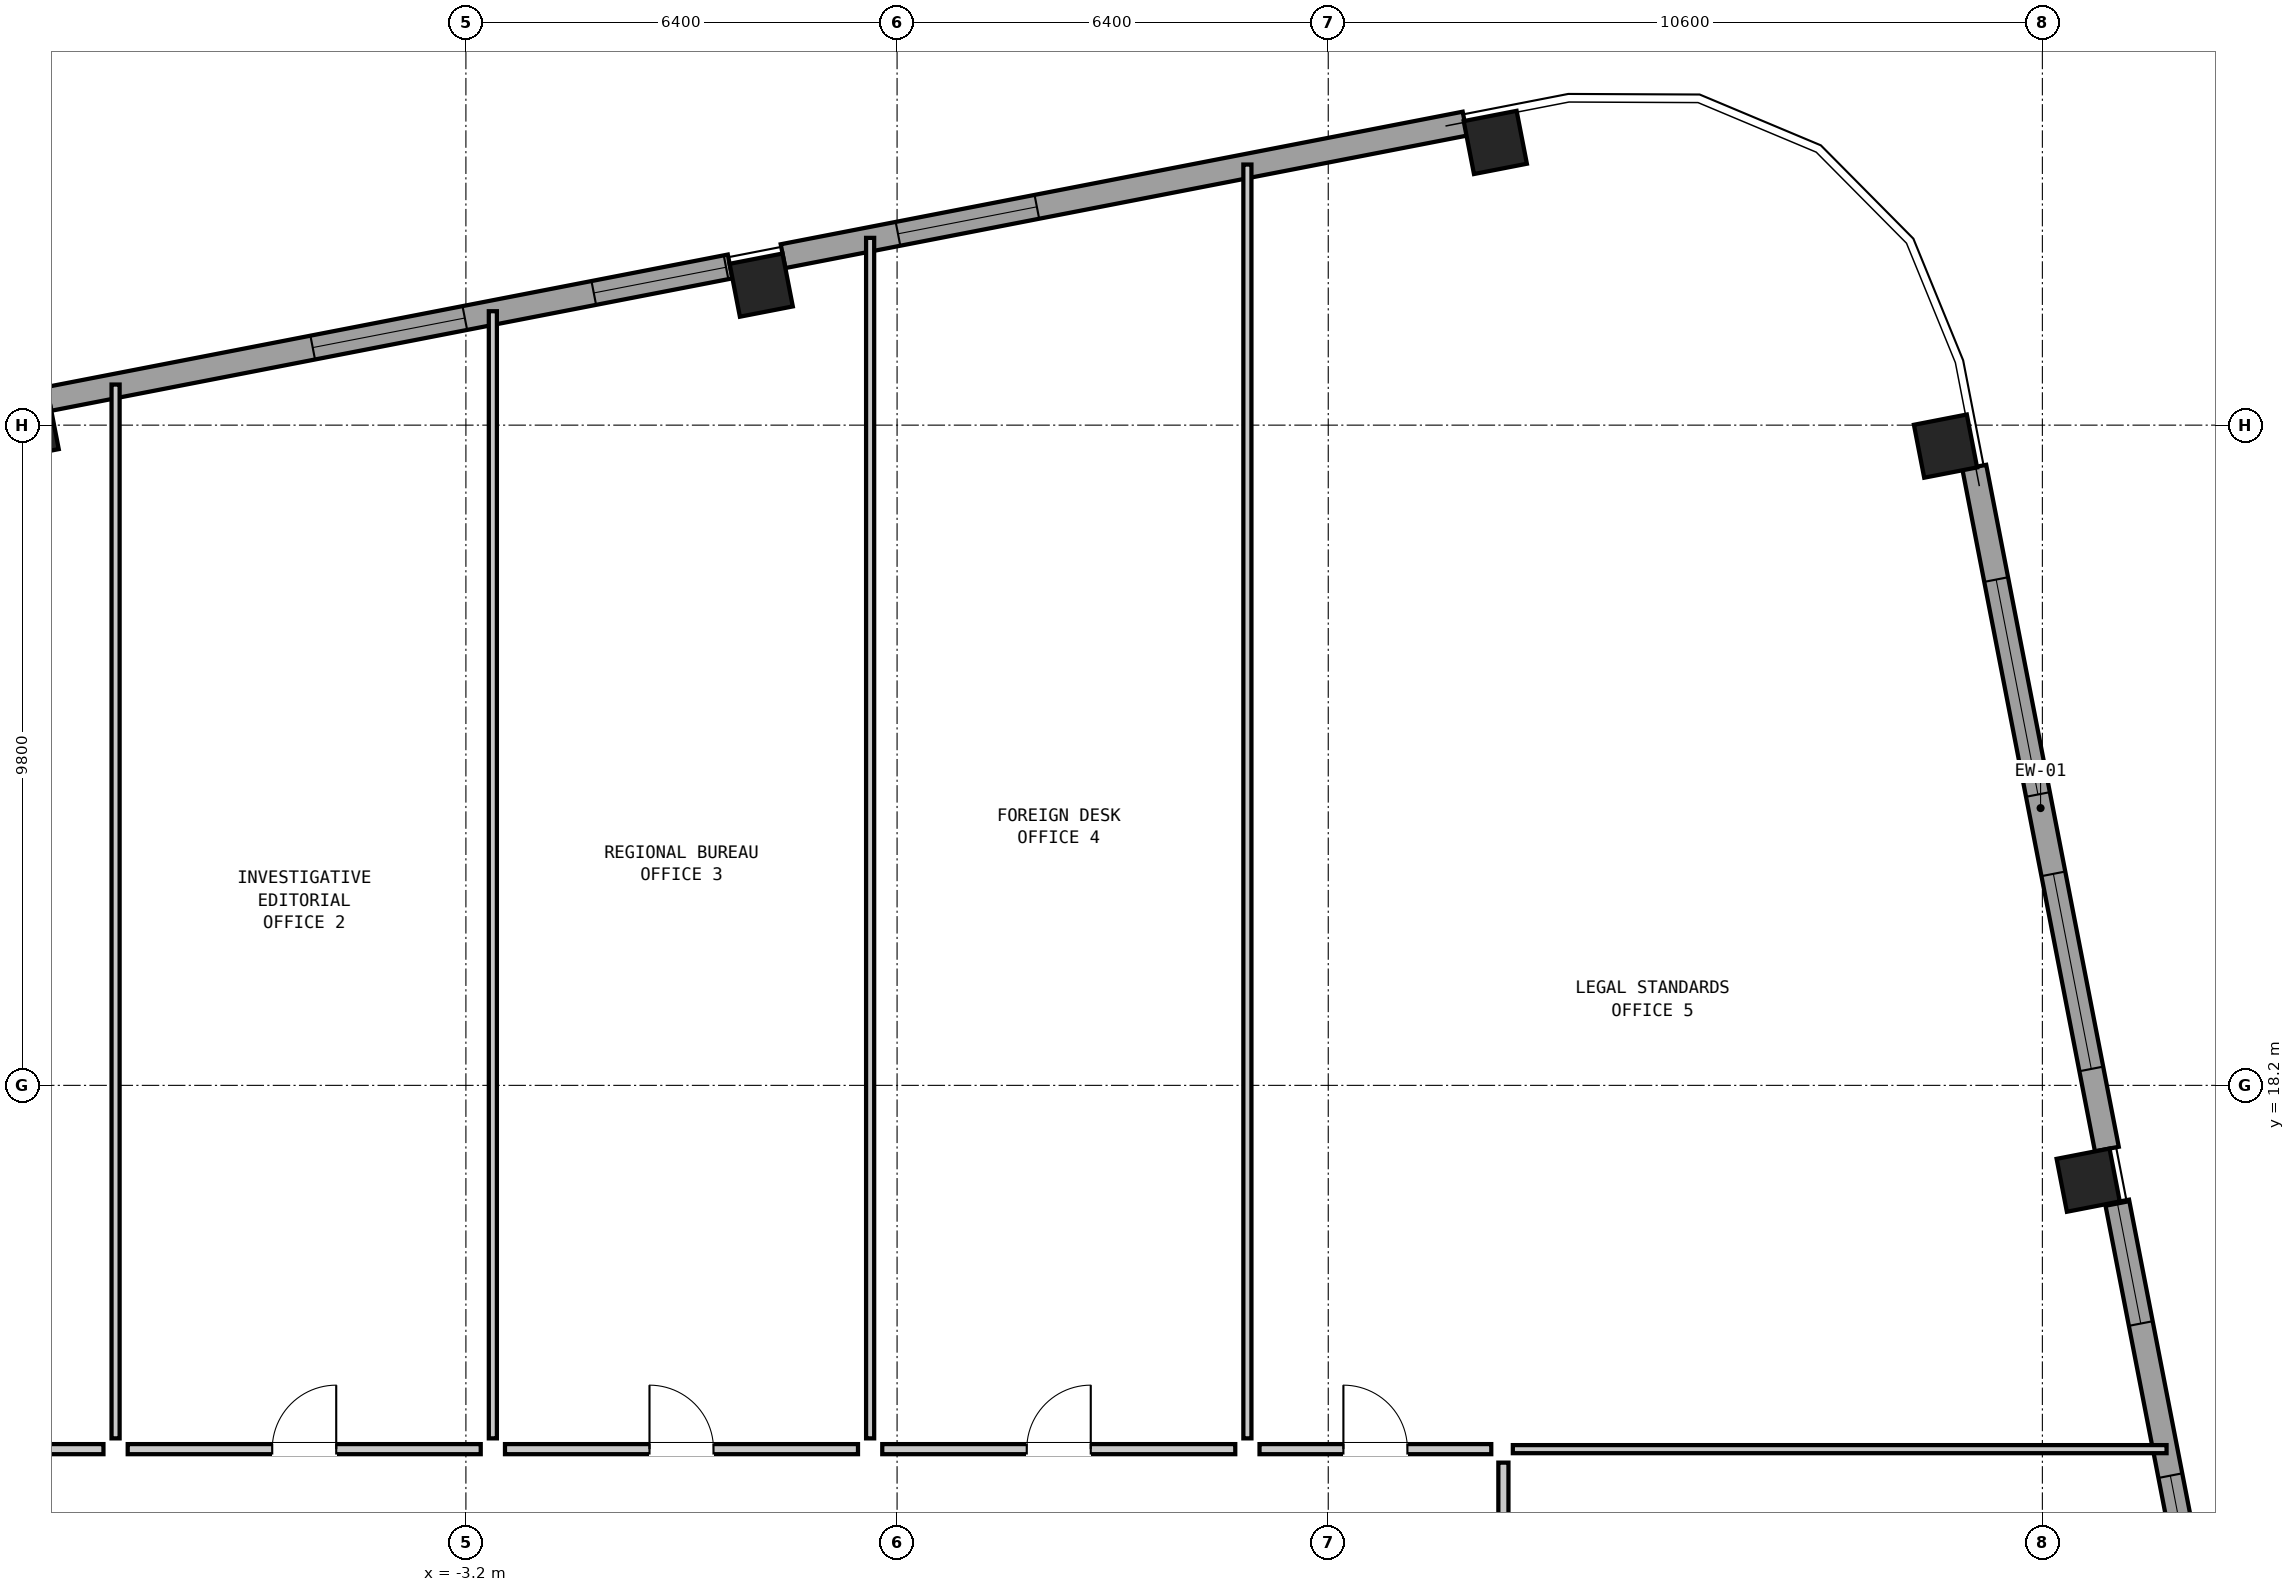
"""IFC4 building model, lengths in metres.
Left out: names, types, materials, properties, quantities, classifications, styles, units other than length and angle.
Written with IfcOpenShell. Run it as: python <this file> out.ifc"""

import sys

from ifc_helpers import new_model, si_unit, direction, frame, frame_2d, origin, origin_2d, place, context, subcontext, project, spatial, rectangle, hollow_rectangle, extrude, element, fill, save


model = new_model("IFC4")
c1 = context("Model", 3, precision=1e-05, world=origin(), true_north=direction((0.0, 1.0)))
c2 = subcontext(c1, "Body", "Model", "MODEL_VIEW")
j1 = project(units=[si_unit("LENGTHUNIT", "METRE"), si_unit("PLANEANGLEUNIT", "RADIAN")], contexts=[c1])
p1 = place(None, origin())
s1 = spatial("IfcSite", under=j1, at=p1, CompositionType="ELEMENT")
p2 = place(p1, origin())
s2 = spatial("IfcBuilding", under=s1, at=p2, CompositionType="ELEMENT")
p3 = place(p2, frame((0.0, 0.0, 121.95)))
s3 = spatial("IfcBuildingStorey", under=s2, at=p3, CompositionType="ELEMENT", Elevation=121.95)
for number, where, z_axis, x_axis in (
    (1, (20.88, 16.792, 0.0), (0.0, 0.0, 1.0), (-0.191, 0.982, 0.0)),
    (2, (18.762, 27.689, 0.0), (0.0, 0.0, 1.0), (-0.191, 0.982, 0.0)),
    (3, (12.08, 32.196, 0.0), (0.0, 0.0, 1.0), (0.982, 0.191, 0.0)),
    (4, (1.183, 30.078, 0.0), (0.0, 0.0, 1.0), (0.982, 0.191, 0.0)),
    (5, (-9.713, 27.96, 0.0), (0.0, 0.0, 1.0), (0.982, 0.191, 0.0)),
):
    element("IfcColumn", number, at=place(p3, frame(where, z_axis=z_axis, x_axis=x_axis)), inside=s3, PredefinedType="COLUMN", context=c2, shape_type="SweptSolid", body=[
        extrude(hollow_rectangle(XDim=0.8, YDim=0.8, WallThickness=0.05, at=origin_2d()), origin(), (0.0, 0.0, 1.0), 3.05),
    ])
p4 = place(p3, frame((19.19, 27.376, 0.0), z_axis=(0.0, 0.0, 1.0), x_axis=(0.190822765986, -0.981624506612, 0.0)))
e6 = element("IfcWall", 6, at=p4, inside=s3, PredefinedType="SOLIDWALL", context=c2, shape_type="SweptSolid", body=[
    extrude(rectangle(XDim=10.312, YDim=0.36, at=frame_2d((5.156, 0.0))), origin(), (0.0, 0.0, 1.0), 2.067),
])
p5 = place(p4, frame((1.7, 0.0, 0.2)))
e7 = element("IfcOpeningElement", 7, at=p5, cuts=e6, PredefinedType="OPENING", context=c2, shape_type="SweptSolid", body=[
    extrude(rectangle(XDim=3.25, YDim=0.85, at=frame_2d((1.625, 0.425))), frame((0.0, 0.192, 0.0), z_axis=(0.0, -1.0, 0.0), x_axis=(1.0, 0.0, 0.0)), (0.0, 0.0, 1.0), 0.384),
])
p6 = place(p4, frame((6.15, 0.0, 0.95)))
e8 = element("IfcOpeningElement", 8, at=p6, cuts=e6, PredefinedType="OPENING", context=c2, shape_type="SweptSolid", body=[
    extrude(rectangle(XDim=2.95, YDim=0.95, at=frame_2d((1.475, 0.475))), frame((0.0, 0.192, 0.0), z_axis=(0.0, -1.0, 0.0), x_axis=(1.0, 0.0, 0.0)), (0.0, 0.0, 1.0), 0.384),
])
p7 = place(p3, frame((21.31, 16.469, 0.0), z_axis=(0.0, 0.0, 1.0), x_axis=(0.190811924826, -0.981626614016, 0.0)))
e9 = element("IfcWall", 9, at=p7, inside=s3, PredefinedType="SOLIDWALL", context=c2, shape_type="SweptSolid", body=[
    extrude(rectangle(XDim=10.3, YDim=0.36, at=frame_2d((5.15, 0.0))), origin(), (0.0, 0.0, 1.0), 2.067),
])
p8 = place(p7, frame((0.038, 0.0, 0.2)))
e10 = element("IfcOpeningElement", 10, at=p8, cuts=e9, PredefinedType="OPENING", context=c2, shape_type="SweptSolid", body=[
    extrude(rectangle(XDim=1.8, YDim=1.25, at=frame_2d((0.9, 0.625))), frame((0.0, 0.192, 0.0), z_axis=(0.0, -1.0, 0.0), x_axis=(1.0, 0.0, 0.0)), (0.0, 0.0, 1.0), 0.384),
])
p9 = place(p7, frame((4.138, 0.0, 0.7)))
e11 = element("IfcOpeningElement", 11, at=p9, cuts=e9, PredefinedType="OPENING", context=c2, shape_type="SweptSolid", body=[
    extrude(rectangle(XDim=2.1, YDim=1.2, at=frame_2d((1.05, 0.6))), frame((0.0, 0.192, 0.0), z_axis=(0.0, -1.0, 0.0), x_axis=(1.0, 0.0, 0.0)), (0.0, 0.0, 1.0), 0.384),
])
p10 = place(p7, frame((8.388, 0.0, 0.2)))
e12 = element("IfcOpeningElement", 12, at=p10, cuts=e9, PredefinedType="OPENING", context=c2, shape_type="SweptSolid", body=[
    extrude(rectangle(XDim=1.85, YDim=1.2, at=frame_2d((0.925, 0.6))), frame((0.0, 0.192, 0.0), z_axis=(0.0, -1.0, 0.0), x_axis=(1.0, 0.0, 0.0)), (0.0, 0.0, 1.0), 0.384),
])
p11 = place(p3, frame((-9.389, 28.39, 0.0), z_axis=(0.0, 0.0, 1.0), x_axis=(0.981627477005, 0.190807485147, 0.0)))
e13 = element("IfcWall", 13, at=p11, inside=s3, PredefinedType="SOLIDWALL", context=c2, shape_type="SweptSolid", body=[
    extrude(rectangle(XDim=10.3, YDim=0.36, at=frame_2d((5.15, 0.0))), origin(), (0.0, 0.0, 1.0), 2.067),
])
p12 = place(p11, frame((3.988, 0.0, 0.8)))
e14 = element("IfcOpeningElement", 14, at=p12, cuts=e13, PredefinedType="OPENING", context=c2, shape_type="SweptSolid", body=[
    extrude(rectangle(XDim=2.3, YDim=1.1, at=frame_2d((1.15, 0.55))), frame((0.0, 0.192, 0.0), z_axis=(0.0, -1.0, 0.0), x_axis=(1.0, 0.0, 0.0)), (0.0, 0.0, 1.0), 0.384),
])
p13 = place(p11, frame((8.238, 0.0, 0.2)))
e15 = element("IfcOpeningElement", 15, at=p13, cuts=e13, PredefinedType="OPENING", context=c2, shape_type="SweptSolid", body=[
    extrude(rectangle(XDim=2.0, YDim=1.05, at=frame_2d((1.0, 0.525))), frame((0.0, 0.192, 0.0), z_axis=(0.0, -1.0, 0.0), x_axis=(1.0, 0.0, 0.0)), (0.0, 0.0, 1.0), 0.384),
])
p14 = place(p3, frame((1.507, 30.508, 0.0), z_axis=(0.0, 0.0, 1.0), x_axis=(0.981628941133, 0.190799952646, 0.0)))
e16 = element("IfcWall", 16, at=p14, inside=s3, PredefinedType="SOLIDWALL", context=c2, shape_type="SweptSolid", body=[
    extrude(rectangle(XDim=10.312, YDim=0.36, at=frame_2d((5.156, 0.0))), origin(), (0.0, 0.0, 1.0), 2.067),
])
p15 = place(p14, frame((1.738, 0.0, 0.8)))
e17 = element("IfcOpeningElement", 17, at=p15, cuts=e16, PredefinedType="OPENING", context=c2, shape_type="SweptSolid", body=[
    extrude(rectangle(XDim=2.1, YDim=1.1, at=frame_2d((1.05, 0.55))), frame((0.0, 0.192, 0.0), z_axis=(0.0, -1.0, 0.0), x_axis=(1.0, 0.0, 0.0)), (0.0, 0.0, 1.0), 0.384),
])
p16 = place(p3, frame((12.34, 12.8, 0.0), z_axis=(0.0, 0.0, 1.0), x_axis=(1.0, 0.0, 0.0)))
e18 = element("IfcWall", 18, at=p16, inside=s3, PredefinedType="PARTITIONING", context=c2, shape_type="SweptSolid", body=[
    extrude(rectangle(XDim=9.703, YDim=0.12, at=frame_2d((4.852, 0.0))), origin(), (0.0, 0.0, 1.0), 2.83),
])
p17 = place(p3, frame((-8.4, 12.96, 0.0), z_axis=(0.0, 0.0, 1.0), x_axis=(0.0, 1.0, 0.0)))
e19 = element("IfcWall", 19, at=p17, inside=s3, PredefinedType="PARTITIONING", context=c2, shape_type="SweptSolid", body=[
    extrude(rectangle(XDim=15.643, YDim=0.12, at=frame_2d((7.821, 0.0))), origin(), (0.0, 0.0, 1.0), 2.83),
])
p18 = place(p3, frame((-2.8, 12.96, 0.0), z_axis=(0.0, 0.0, 1.0), x_axis=(0.0, 1.0, 0.0)))
e20 = element("IfcWall", 20, at=p18, inside=s3, PredefinedType="PARTITIONING", context=c2, shape_type="SweptSolid", body=[
    extrude(rectangle(XDim=16.731, YDim=0.12, at=frame_2d((8.366, 0.0))), origin(), (0.0, 0.0, 1.0), 2.347),
])
p19 = place(p3, frame((2.8, 12.96, 0.0), z_axis=(0.0, 0.0, 1.0), x_axis=(0.0, 1.0, 0.0)))
e21 = element("IfcWall", 21, at=p19, inside=s3, PredefinedType="PARTITIONING", context=c2, shape_type="SweptSolid", body=[
    extrude(rectangle(XDim=17.82, YDim=0.12, at=frame_2d((8.91, 0.0))), origin(), (0.0, 0.0, 1.0), 2.347),
])
p20 = place(p3, frame((8.4, 12.96, 0.0), z_axis=(0.0, 0.0, 1.0), x_axis=(0.0, 1.0, 0.0)))
e22 = element("IfcWall", 22, at=p20, inside=s3, PredefinedType="PARTITIONING", context=c2, shape_type="SweptSolid", body=[
    extrude(rectangle(XDim=18.908, YDim=0.12, at=frame_2d((9.454, 0.0))), origin(), (0.0, 0.0, 1.0), 2.83),
])
p21 = place(p3, frame((-12.02, 12.8, 0.0), z_axis=(0.0, 0.0, 1.0), x_axis=(1.0, 0.0, 0.0)))
e23 = element("IfcWall", 23, at=p21, inside=s3, PredefinedType="PARTITIONING", context=c2, shape_type="SweptSolid", body=[
    extrude(rectangle(XDim=3.44, YDim=0.15, at=frame_2d((1.72, 0.0))), origin(), (0.0, 0.0, 1.0), 2.83),
])
p22 = place(p21, frame((1.245, 0.0, 0.0)))
e24 = element("IfcOpeningElement", 24, at=p22, cuts=e23, PredefinedType="OPENING", context=c2, shape_type="SweptSolid", body=[
    extrude(rectangle(XDim=0.95, YDim=2.1, at=frame_2d((0.475, 1.05))), frame((0.0, 0.087, 0.0), z_axis=(0.0, -1.0, 0.0), x_axis=(1.0, 0.0, 0.0)), (0.0, 0.0, 1.0), 0.174),
])
p23 = place(p3, frame((-8.22, 12.8, 0.0), z_axis=(0.0, 0.0, 1.0), x_axis=(1.0, 0.0, 0.0)))
e25 = element("IfcWall", 25, at=p23, inside=s3, PredefinedType="PARTITIONING", context=c2, shape_type="SweptSolid", body=[
    extrude(rectangle(XDim=5.24, YDim=0.15, at=frame_2d((2.62, 0.0))), origin(), (0.0, 0.0, 1.0), 2.83),
])
p24 = place(p23, frame((2.145, 0.0, 0.0)))
e26 = element("IfcOpeningElement", 26, at=p24, cuts=e25, PredefinedType="OPENING", context=c2, shape_type="SweptSolid", body=[
    extrude(rectangle(XDim=0.95, YDim=2.1, at=frame_2d((0.475, 1.05))), frame((0.0, 0.087, 0.0), z_axis=(0.0, -1.0, 0.0), x_axis=(1.0, 0.0, 0.0)), (0.0, 0.0, 1.0), 0.174),
])
p25 = place(p3, frame((-2.62, 12.8, 0.0), z_axis=(0.0, 0.0, 1.0), x_axis=(1.0, 0.0, 0.0)))
e27 = element("IfcWall", 27, at=p25, inside=s3, PredefinedType="PARTITIONING", context=c2, shape_type="SweptSolid", body=[
    extrude(rectangle(XDim=5.24, YDim=0.15, at=frame_2d((2.62, 0.0))), origin(), (0.0, 0.0, 1.0), 2.83),
])
p26 = place(p25, frame((2.145, 0.0, 0.0)))
e28 = element("IfcOpeningElement", 28, at=p26, cuts=e27, PredefinedType="OPENING", context=c2, shape_type="SweptSolid", body=[
    extrude(rectangle(XDim=0.95, YDim=2.1, at=frame_2d((0.475, 1.05))), frame((0.0, 0.087, 0.0), z_axis=(0.0, -1.0, 0.0), x_axis=(1.0, 0.0, 0.0)), (0.0, 0.0, 1.0), 0.174),
])
p27 = place(p3, frame((2.98, 12.8, 0.0), z_axis=(0.0, 0.0, 1.0), x_axis=(1.0, 0.0, 0.0)))
e29 = element("IfcWall", 29, at=p27, inside=s3, PredefinedType="PARTITIONING", context=c2, shape_type="SweptSolid", body=[
    extrude(rectangle(XDim=5.24, YDim=0.15, at=frame_2d((2.62, 0.0))), origin(), (0.0, 0.0, 1.0), 2.83),
])
p28 = place(p27, frame((2.145, 0.0, 0.0)))
e30 = element("IfcOpeningElement", 30, at=p28, cuts=e29, PredefinedType="OPENING", context=c2, shape_type="SweptSolid", body=[
    extrude(rectangle(XDim=0.95, YDim=2.1, at=frame_2d((0.475, 1.05))), frame((0.0, 0.087, 0.0), z_axis=(0.0, -1.0, 0.0), x_axis=(1.0, 0.0, 0.0)), (0.0, 0.0, 1.0), 0.174),
])
p29 = place(p3, frame((8.58, 12.8, 0.0), z_axis=(0.0, 0.0, 1.0), x_axis=(1.0, 0.0, 0.0)))
e31 = element("IfcWall", 31, at=p29, inside=s3, PredefinedType="PARTITIONING", context=c2, shape_type="SweptSolid", body=[
    extrude(rectangle(XDim=3.44, YDim=0.15, at=frame_2d((1.72, 0.0))), origin(), (0.0, 0.0, 1.0), 2.83),
])
p30 = place(p29, frame((1.245, 0.0, 0.0)))
e32 = element("IfcOpeningElement", 32, at=p30, cuts=e31, PredefinedType="OPENING", context=c2, shape_type="SweptSolid", body=[
    extrude(rectangle(XDim=0.95, YDim=2.1, at=frame_2d((0.475, 1.05))), frame((0.0, 0.087, 0.0), z_axis=(0.0, -1.0, 0.0), x_axis=(1.0, 0.0, 0.0)), (0.0, 0.0, 1.0), 0.174),
])
p31 = place(p3, frame((12.2, 3.8, 0.0), z_axis=(0.0, 0.0, 1.0), x_axis=(0.0, 1.0, 0.0)))
e33 = element("IfcWall", 33, at=p31, inside=s3, PredefinedType="PARTITIONING", context=c2, shape_type="SweptSolid", body=[
    extrude(rectangle(XDim=8.8, YDim=0.15, at=frame_2d((4.4, 0.0))), origin(), (0.0, 0.0, 1.0), 2.83),
])
p32 = place(p31, frame((3.925, 0.0, 0.0)))
e34 = element("IfcOpeningElement", 34, at=p32, cuts=e33, PredefinedType="OPENING", context=c2, shape_type="SweptSolid", body=[
    extrude(rectangle(XDim=0.95, YDim=2.1, at=frame_2d((0.475, 1.05))), frame((0.0, 0.087, 0.0), z_axis=(0.0, -1.0, 0.0), x_axis=(1.0, 0.0, 0.0)), (0.0, 0.0, 1.0), 0.174),
])
p33 = place(p5, origin())
e35 = element("IfcWindow", 35, at=p33, inside=s3, PartitioningType="SINGLE_PANEL", PredefinedType="WINDOW", context=c2, shape_type="SweptSolid", body=[
    extrude(rectangle(XDim=3.25, YDim=0.85, at=frame_2d((1.625, 0.425))), frame((0.0, 0.03, 0.0), z_axis=(0.0, -1.0, 0.0), x_axis=(1.0, 0.0, 0.0)), (0.0, 0.0, 1.0), 0.06),
])
fill(e7, e35)
p34 = place(p6, origin())
e36 = element("IfcWindow", 36, at=p34, inside=s3, PartitioningType="SINGLE_PANEL", PredefinedType="WINDOW", context=c2, shape_type="SweptSolid", body=[
    extrude(rectangle(XDim=2.95, YDim=0.95, at=frame_2d((1.475, 0.475))), frame((0.0, 0.03, 0.0), z_axis=(0.0, -1.0, 0.0), x_axis=(1.0, 0.0, 0.0)), (0.0, 0.0, 1.0), 0.06),
])
fill(e8, e36)
p35 = place(p8, origin())
e37 = element("IfcWindow", 37, at=p35, inside=s3, PartitioningType="SINGLE_PANEL", PredefinedType="WINDOW", context=c2, shape_type="SweptSolid", body=[
    extrude(rectangle(XDim=1.8, YDim=1.25, at=frame_2d((0.9, 0.625))), frame((0.0, 0.03, 0.0), z_axis=(0.0, -1.0, 0.0), x_axis=(1.0, 0.0, 0.0)), (0.0, 0.0, 1.0), 0.06),
])
fill(e10, e37)
p36 = place(p9, origin())
e38 = element("IfcWindow", 38, at=p36, inside=s3, PartitioningType="SINGLE_PANEL", PredefinedType="WINDOW", context=c2, shape_type="SweptSolid", body=[
    extrude(rectangle(XDim=2.1, YDim=1.2, at=frame_2d((1.05, 0.6))), frame((0.0, 0.03, 0.0), z_axis=(0.0, -1.0, 0.0), x_axis=(1.0, 0.0, 0.0)), (0.0, 0.0, 1.0), 0.06),
])
fill(e11, e38)
p37 = place(p12, origin())
e39 = element("IfcWindow", 39, at=p37, inside=s3, PartitioningType="SINGLE_PANEL", PredefinedType="WINDOW", context=c2, shape_type="SweptSolid", body=[
    extrude(rectangle(XDim=2.3, YDim=1.1, at=frame_2d((1.15, 0.55))), frame((0.0, 0.03, 0.0), z_axis=(0.0, -1.0, 0.0), x_axis=(1.0, 0.0, 0.0)), (0.0, 0.0, 1.0), 0.06),
])
fill(e14, e39)
p38 = place(p13, origin())
e40 = element("IfcWindow", 40, at=p38, inside=s3, PartitioningType="SINGLE_PANEL", PredefinedType="WINDOW", context=c2, shape_type="SweptSolid", body=[
    extrude(rectangle(XDim=2.0, YDim=1.05, at=frame_2d((1.0, 0.525))), frame((0.0, 0.03, 0.0), z_axis=(0.0, -1.0, 0.0), x_axis=(1.0, 0.0, 0.0)), (0.0, 0.0, 1.0), 0.06),
])
fill(e15, e40)
p39 = place(p15, origin())
e41 = element("IfcWindow", 41, at=p39, inside=s3, PartitioningType="SINGLE_PANEL", PredefinedType="WINDOW", context=c2, shape_type="SweptSolid", body=[
    extrude(rectangle(XDim=2.1, YDim=1.1, at=frame_2d((1.05, 0.55))), frame((0.0, 0.03, 0.0), z_axis=(0.0, -1.0, 0.0), x_axis=(1.0, 0.0, 0.0)), (0.0, 0.0, 1.0), 0.06),
])
fill(e17, e41)
p40 = place(p24, origin())
e42 = element("IfcDoor", 42, at=p40, inside=s3, OperationType="SINGLE_SWING_RIGHT", PredefinedType="DOOR", context=c2, shape_type="SweptSolid", body=[
    extrude(rectangle(XDim=0.95, YDim=2.1, at=frame_2d((0.475, 1.05))), frame((0.0, 0.025, 0.0), z_axis=(0.0, -1.0, 0.0), x_axis=(1.0, 0.0, 0.0)), (0.0, 0.0, 1.0), 0.05),
])
fill(e26, e42)
p41 = place(p26, origin())
e43 = element("IfcDoor", 43, at=p41, inside=s3, OperationType="SINGLE_SWING_LEFT", PredefinedType="DOOR", context=c2, shape_type="SweptSolid", body=[
    extrude(rectangle(XDim=0.95, YDim=2.1, at=frame_2d((0.475, 1.05))), frame((0.0, 0.025, 0.0), z_axis=(0.0, -1.0, 0.0), x_axis=(1.0, 0.0, 0.0)), (0.0, 0.0, 1.0), 0.05),
])
fill(e28, e43)
p42 = place(p28, origin())
e44 = element("IfcDoor", 44, at=p42, inside=s3, OperationType="SINGLE_SWING_RIGHT", PredefinedType="DOOR", context=c2, shape_type="SweptSolid", body=[
    extrude(rectangle(XDim=0.95, YDim=2.1, at=frame_2d((0.475, 1.05))), frame((0.0, 0.025, 0.0), z_axis=(0.0, -1.0, 0.0), x_axis=(1.0, 0.0, 0.0)), (0.0, 0.0, 1.0), 0.05),
])
fill(e30, e44)
p43 = place(p30, origin())
e45 = element("IfcDoor", 45, at=p43, inside=s3, OperationType="SINGLE_SWING_LEFT", PredefinedType="DOOR", context=c2, shape_type="SweptSolid", body=[
    extrude(rectangle(XDim=0.95, YDim=2.1, at=frame_2d((0.475, 1.05))), frame((0.0, 0.025, 0.0), z_axis=(0.0, -1.0, 0.0), x_axis=(1.0, 0.0, 0.0)), (0.0, 0.0, 1.0), 0.05),
])
fill(e32, e45)
save(model, sys.argv[1])
